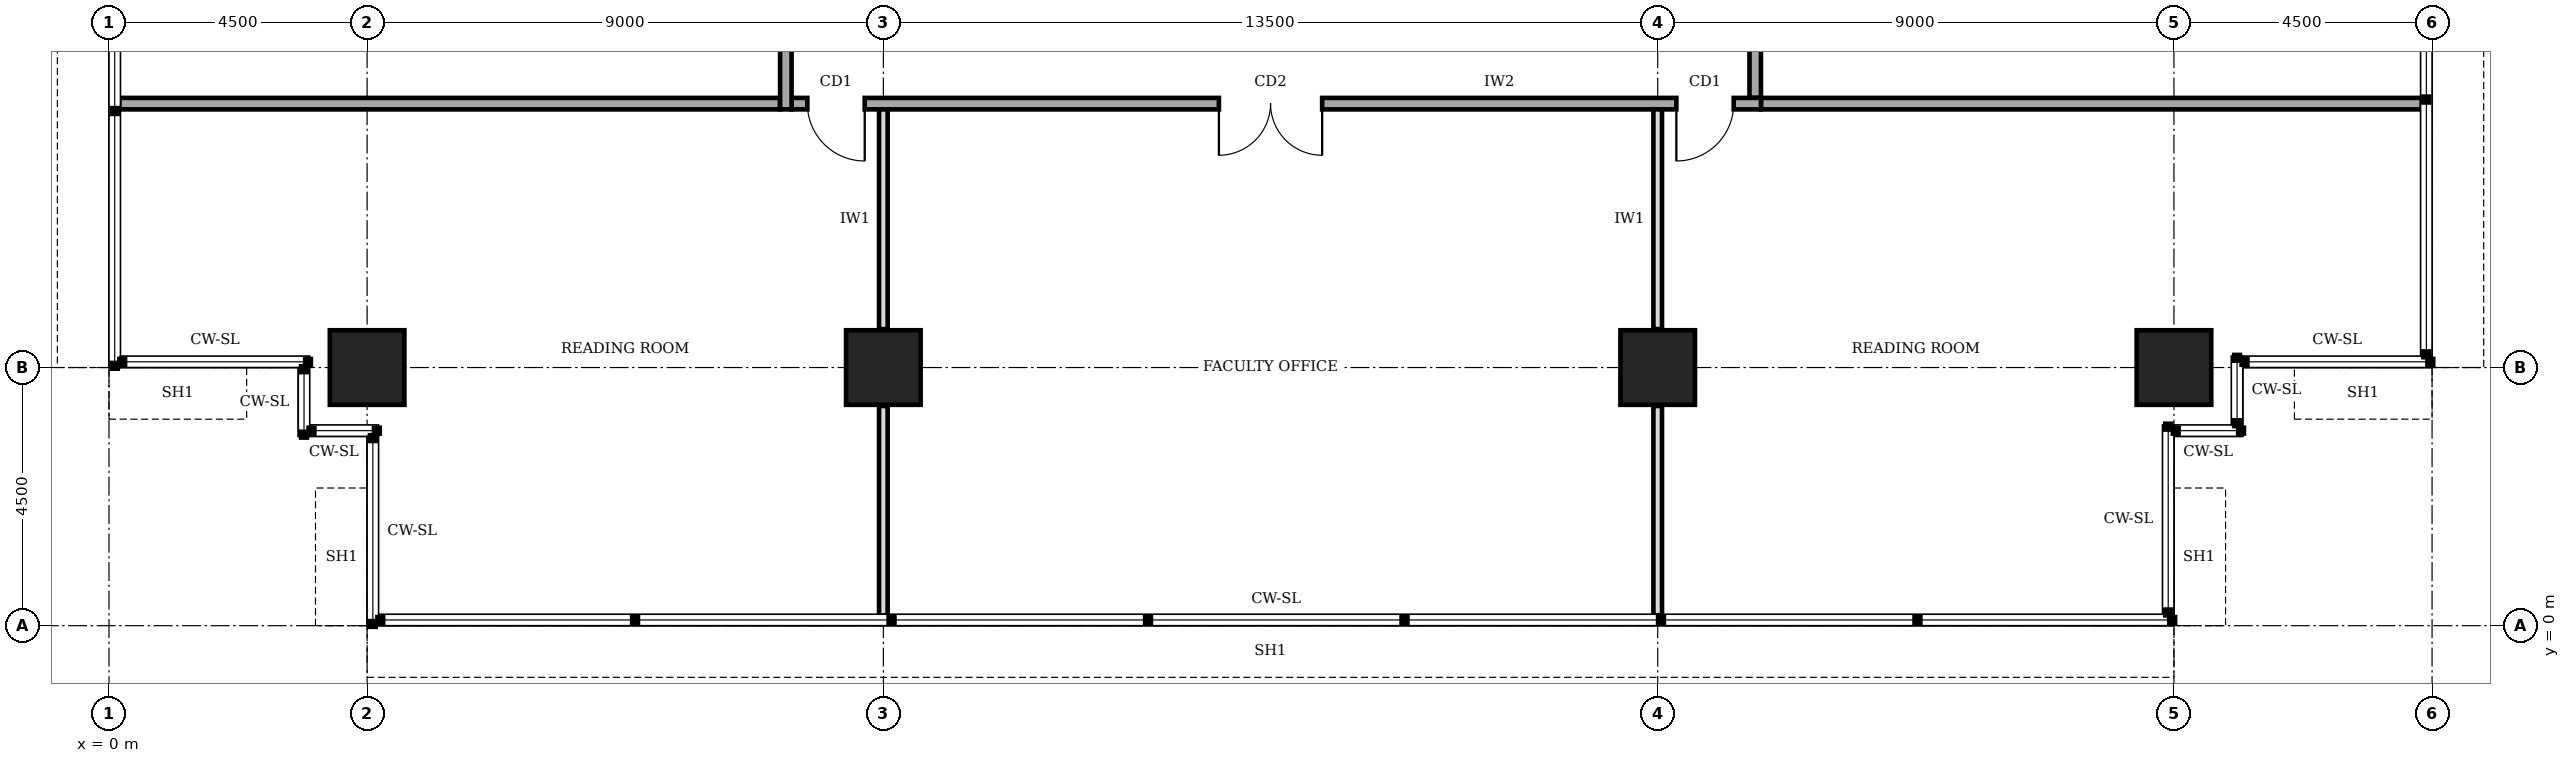
"""IFC4 building model, lengths in metres.
Left out: names, types, materials, properties, quantities, classifications, styles, units other than length and angle.
Written with IfcOpenShell. Run it as: python <this file> out.ifc"""

import sys

from ifc_helpers import new_model, si_unit, direction, frame, frame_2d, origin, origin_2d, place, context, subcontext, project, spatial, rectangle, extrude, element, fill, save


model = new_model("IFC4")
c1 = context("Model", 3, precision=1e-05, world=origin(), true_north=direction((0.0, 1.0)))
c2 = subcontext(c1, "Body", "Model", "MODEL_VIEW")
j1 = project(units=[si_unit("LENGTHUNIT", "METRE"), si_unit("PLANEANGLEUNIT", "RADIAN")], contexts=[c1])
p1 = place(None, origin())
s1 = spatial("IfcSite", under=j1, at=p1, CompositionType="ELEMENT")
p2 = place(p1, origin())
s2 = spatial("IfcBuilding", under=s1, at=p2, CompositionType="ELEMENT")
p3 = place(p2, frame((0.0, 0.0, 293.0)))
s3 = spatial("IfcBuildingStorey", under=s2, at=p3, CompositionType="ELEMENT", Elevation=293.0)
for number, where, z_axis, x_axis in (
    (1, (4.5, 4.5, 0.0), (0.0, 0.0, 1.0), (1.0, 0.0, 0.0)),
    (2, (13.5, 4.5, 0.0), (0.0, 0.0, 1.0), (1.0, 0.0, 0.0)),
    (3, (27.0, 4.5, 0.0), (0.0, 0.0, 1.0), (1.0, 0.0, 0.0)),
    (4, (36.0, 4.5, 0.0), (0.0, 0.0, 1.0), (1.0, 0.0, 0.0)),
):
    element("IfcColumn", number, at=place(p3, frame(where, z_axis=z_axis, x_axis=x_axis)), inside=s3, PredefinedType="COLUMN", context=c2, shape_type="SweptSolid", body=[
        extrude(rectangle(XDim=1.3, YDim=1.3, at=origin_2d()), origin(), (0.0, 0.0, 1.0), 4.0),
    ])
p4 = place(p3, frame((11.9, 9.1, 0.0), z_axis=(0.0, 0.0, 1.0), x_axis=(1.0, 0.0, 0.0)))
e5 = element("IfcWall", 5, at=p4, inside=s3, PredefinedType="SOLIDWALL", context=c2, shape_type="SweptSolid", body=[
    extrude(rectangle(XDim=16.9, YDim=0.2, at=frame_2d((8.45, 0.0))), origin(), (0.0, 0.0, 1.0), 3.75),
])
p5 = place(p4, frame((0.275, 0.0, 0.0)))
e6 = element("IfcOpeningElement", 6, at=p5, cuts=e5, PredefinedType="OPENING", context=c2, shape_type="SweptSolid", body=[
    extrude(rectangle(XDim=1.0, YDim=2.1, at=frame_2d((0.5, 1.05))), frame((0.0, 0.11, 0.0), z_axis=(0.0, -1.0, 0.0), x_axis=(1.0, 0.0, 0.0)), (0.0, 0.0, 1.0), 0.22),
])
p6 = place(p4, frame((7.45, 0.0, 0.0)))
e7 = element("IfcOpeningElement", 7, at=p6, cuts=e5, PredefinedType="OPENING", context=c2, shape_type="SweptSolid", body=[
    extrude(rectangle(XDim=1.8, YDim=2.1, at=frame_2d((0.9, 1.05))), frame((0.0, 0.11, 0.0), z_axis=(0.0, -1.0, 0.0), x_axis=(1.0, 0.0, 0.0)), (0.0, 0.0, 1.0), 0.22),
])
p7 = place(p4, frame((15.425, 0.0, 0.0)))
e8 = element("IfcOpeningElement", 8, at=p7, cuts=e5, PredefinedType="OPENING", context=c2, shape_type="SweptSolid", body=[
    extrude(rectangle(XDim=1.0, YDim=2.1, at=frame_2d((0.5, 1.05))), frame((0.0, 0.11, 0.0), z_axis=(0.0, -1.0, 0.0), x_axis=(1.0, 0.0, 0.0)), (0.0, 0.0, 1.0), 0.22),
])
p8 = place(p3, frame((28.7, 9.2, 0.0), z_axis=(0.0, 0.0, 1.0), x_axis=(0.0, 1.0, 0.0)))
e9 = element("IfcWall", 9, at=p8, inside=s3, PredefinedType="SOLIDWALL", context=c2, shape_type="SweptSolid", body=[
    extrude(rectangle(XDim=22.3, YDim=0.2, at=frame_2d((11.15, 0.0))), origin(), (0.0, 0.0, 1.0), 3.75),
])
p9 = place(p8, frame((10.15, 0.0, 0.0)))
e10 = element("IfcOpeningElement", 10, at=p9, cuts=e9, PredefinedType="OPENING", context=c2, shape_type="SweptSolid", body=[
    extrude(rectangle(XDim=1.8, YDim=2.1, at=frame_2d((0.9, 1.05))), frame((0.0, 0.11, 0.0), z_axis=(0.0, -1.0, 0.0), x_axis=(1.0, 0.0, 0.0)), (0.0, 0.0, 1.0), 0.22),
])
p10 = place(p3, frame((11.8, 31.3, 0.0), z_axis=(0.0, 0.0, 1.0), x_axis=(0.0, -1.0, 0.0)))
e11 = element("IfcWall", 11, at=p10, inside=s3, PredefinedType="SOLIDWALL", context=c2, shape_type="SweptSolid", body=[
    extrude(rectangle(XDim=22.3, YDim=0.2, at=frame_2d((11.15, 0.0))), origin(), (0.0, 0.0, 1.0), 3.75),
])
p11 = place(p10, frame((19.55, 0.0, 0.0)))
e12 = element("IfcOpeningElement", 12, at=p11, cuts=e11, PredefinedType="OPENING", context=c2, shape_type="SweptSolid", body=[
    extrude(rectangle(XDim=1.0, YDim=2.1, at=frame_2d((0.5, 1.05))), frame((0.0, 0.11, 0.0), z_axis=(0.0, -1.0, 0.0), x_axis=(1.0, 0.0, 0.0)), (0.0, 0.0, 1.0), 0.22),
])
p12 = place(p10, frame((15.45, 0.0, 0.0)))
e13 = element("IfcOpeningElement", 13, at=p12, cuts=e11, PredefinedType="OPENING", context=c2, shape_type="SweptSolid", body=[
    extrude(rectangle(XDim=0.9, YDim=2.1, at=frame_2d((0.45, 1.05))), frame((0.0, 0.11, 0.0), z_axis=(0.0, -1.0, 0.0), x_axis=(1.0, 0.0, 0.0)), (0.0, 0.0, 1.0), 0.22),
])
p13 = place(p10, frame((12.45, 0.0, 0.0)))
e14 = element("IfcOpeningElement", 14, at=p13, cuts=e11, PredefinedType="OPENING", context=c2, shape_type="SweptSolid", body=[
    extrude(rectangle(XDim=0.9, YDim=2.1, at=frame_2d((0.45, 1.05))), frame((0.0, 0.11, 0.0), z_axis=(0.0, -1.0, 0.0), x_axis=(1.0, 0.0, 0.0)), (0.0, 0.0, 1.0), 0.22),
])
p14 = place(p10, frame((7.6, 0.0, 0.0)))
e15 = element("IfcOpeningElement", 15, at=p14, cuts=e11, PredefinedType="OPENING", context=c2, shape_type="SweptSolid", body=[
    extrude(rectangle(XDim=0.9, YDim=2.1, at=frame_2d((0.45, 1.05))), frame((0.0, 0.11, 0.0), z_axis=(0.0, -1.0, 0.0), x_axis=(1.0, 0.0, 0.0)), (0.0, 0.0, 1.0), 0.22),
])
p15 = place(p10, frame((4.8, 0.0, 0.0)))
e16 = element("IfcOpeningElement", 16, at=p15, cuts=e11, PredefinedType="OPENING", context=c2, shape_type="SweptSolid", body=[
    extrude(rectangle(XDim=1.0, YDim=2.1, at=frame_2d((0.5, 1.05))), frame((0.0, 0.11, 0.0), z_axis=(0.0, -1.0, 0.0), x_axis=(1.0, 0.0, 0.0)), (0.0, 0.0, 1.0), 0.22),
])
p16 = place(p10, frame((10.3, 0.0, 0.0)))
e17 = element("IfcOpeningElement", 17, at=p16, cuts=e11, PredefinedType="OPENING", context=c2, shape_type="SweptSolid", body=[
    extrude(rectangle(XDim=1.0, YDim=2.1, at=frame_2d((0.5, 1.05))), frame((0.0, 0.11, 0.0), z_axis=(0.0, -1.0, 0.0), x_axis=(1.0, 0.0, 0.0)), (0.0, 0.0, 1.0), 0.22),
])
p17 = place(p10, frame((1.55, 0.0, 0.0)))
e18 = element("IfcOpeningElement", 18, at=p17, cuts=e11, PredefinedType="OPENING", context=c2, shape_type="SweptSolid", body=[
    extrude(rectangle(XDim=1.0, YDim=2.1, at=frame_2d((0.5, 1.05))), frame((0.0, 0.11, 0.0), z_axis=(0.0, -1.0, 0.0), x_axis=(1.0, 0.0, 0.0)), (0.0, 0.0, 1.0), 0.22),
])
for number, where, z_axis, x_axis in (
    (19, (0.18, 9.1, 0.0), (0.0, 0.0, 1.0), (1.0, 0.0, 0.0)),
    (20, (28.8, 9.1, 0.0), (0.0, 0.0, 1.0), (1.0, 0.0, 0.0)),
):
    element("IfcWall", number, at=place(p3, frame(where, z_axis=z_axis, x_axis=x_axis)), inside=s3, PredefinedType="SOLIDWALL", context=c2, shape_type="SweptSolid", body=[
        extrude(rectangle(XDim=11.52, YDim=0.2, at=frame_2d((5.76, 0.0))), origin(), (0.0, 0.0, 1.0), 3.75),
    ])
p18 = place(p3, frame((13.5, 0.18, 0.0), z_axis=(0.0, 0.0, 1.0), x_axis=(0.0, 1.0, 0.0)))
e21 = element("IfcWall", 21, at=p18, inside=s3, PredefinedType="PARTITIONING", context=c2, shape_type="SweptSolid", body=[
    extrude(rectangle(XDim=3.65, YDim=0.15, at=frame_2d((1.825, 0.0))), origin(), (0.0, 0.0, 1.0), 2.85),
])
p19 = place(p3, frame((13.5, 5.17, 0.0), z_axis=(0.0, 0.0, 1.0), x_axis=(0.0, 1.0, 0.0)))
e22 = element("IfcWall", 22, at=p19, inside=s3, PredefinedType="PARTITIONING", context=c2, shape_type="SweptSolid", body=[
    extrude(rectangle(XDim=3.83, YDim=0.15, at=frame_2d((1.915, 0.0))), origin(), (0.0, 0.0, 1.0), 2.85),
])
p20 = place(p3, frame((27.0, 0.18, 0.0), z_axis=(0.0, 0.0, 1.0), x_axis=(0.0, 1.0, 0.0)))
e23 = element("IfcWall", 23, at=p20, inside=s3, PredefinedType="PARTITIONING", context=c2, shape_type="SweptSolid", body=[
    extrude(rectangle(XDim=3.65, YDim=0.15, at=frame_2d((1.825, 0.0))), origin(), (0.0, 0.0, 1.0), 2.85),
])
p21 = place(p3, frame((27.0, 5.17, 0.0), z_axis=(0.0, 0.0, 1.0), x_axis=(0.0, 1.0, 0.0)))
e24 = element("IfcWall", 24, at=p21, inside=s3, PredefinedType="PARTITIONING", context=c2, shape_type="SweptSolid", body=[
    extrude(rectangle(XDim=3.83, YDim=0.15, at=frame_2d((1.915, 0.0))), origin(), (0.0, 0.0, 1.0), 2.85),
])
p22 = place(p5, frame((1.0, 0.0, 0.0), z_axis=(0.0, 0.0, 1.0), x_axis=(-1.0, 0.0, 0.0)))
e25 = element("IfcDoor", 25, at=p22, inside=s3, OperationType="SINGLE_SWING_LEFT", PredefinedType="DOOR", context=c2, shape_type="SweptSolid", body=[
    extrude(rectangle(XDim=1.0, YDim=2.1, at=frame_2d((0.5, 1.05))), frame((0.0, 0.025, 0.0), z_axis=(0.0, -1.0, 0.0), x_axis=(1.0, 0.0, 0.0)), (0.0, 0.0, 1.0), 0.05),
])
fill(e6, e25)
p23 = place(p6, frame((1.8, 0.0, 0.0), z_axis=(0.0, 0.0, 1.0), x_axis=(-1.0, 0.0, 0.0)))
e26 = element("IfcDoor", 26, at=p23, inside=s3, OperationType="DOUBLE_DOOR_SINGLE_SWING", PredefinedType="DOOR", context=c2, shape_type="SweptSolid", body=[
    extrude(rectangle(XDim=1.8, YDim=2.1, at=frame_2d((0.9, 1.05))), frame((0.0, 0.025, 0.0), z_axis=(0.0, -1.0, 0.0), x_axis=(1.0, 0.0, 0.0)), (0.0, 0.0, 1.0), 0.05),
])
fill(e7, e26)
p24 = place(p7, frame((1.0, 0.0, 0.0), z_axis=(0.0, 0.0, 1.0), x_axis=(-1.0, 0.0, 0.0)))
e27 = element("IfcDoor", 27, at=p24, inside=s3, OperationType="SINGLE_SWING_RIGHT", PredefinedType="DOOR", context=c2, shape_type="SweptSolid", body=[
    extrude(rectangle(XDim=1.0, YDim=2.1, at=frame_2d((0.5, 1.05))), frame((0.0, 0.025, 0.0), z_axis=(0.0, -1.0, 0.0), x_axis=(1.0, 0.0, 0.0)), (0.0, 0.0, 1.0), 0.05),
])
fill(e8, e27)
save(model, sys.argv[1])
